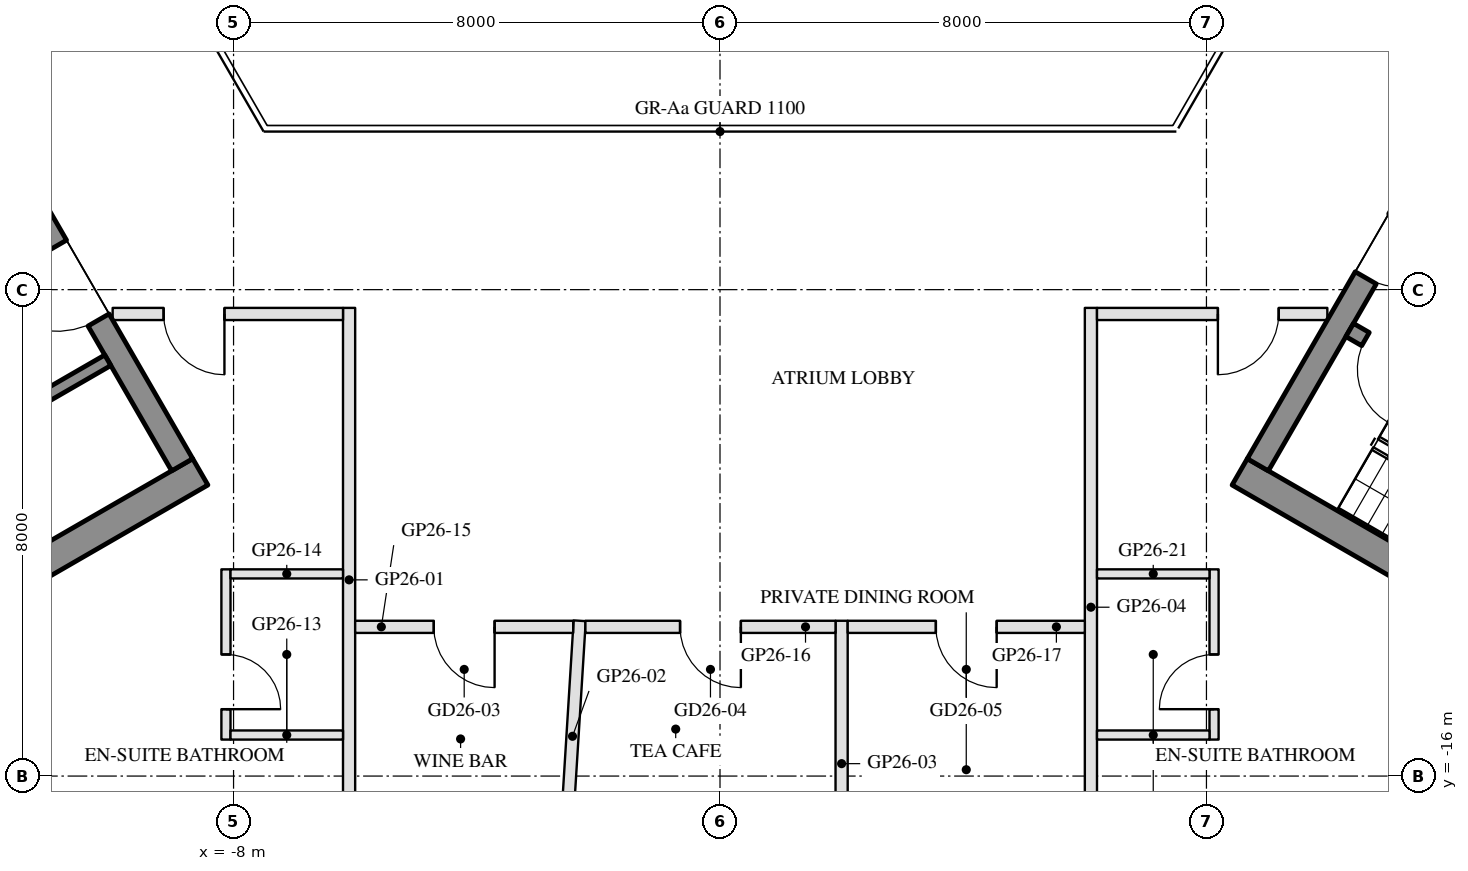
"""IFC4 building model, lengths in metres.
Left out: names, types, materials, properties, quantities, classifications, styles, units other than length and angle.
Written with IfcOpenShell. Run it as: python <this file> out.ifc"""

import sys

from ifc_helpers import new_model, si_unit, direction, frame, frame_2d, origin, place, context, subcontext, project, spatial, rectangle, extrude, element, fill, save


model = new_model("IFC4")
c1 = context("Model", 3, precision=1e-05, world=origin(), true_north=direction((0.0, 1.0)))
c2 = subcontext(c1, "Body", "Model", "MODEL_VIEW")
j1 = project(units=[si_unit("LENGTHUNIT", "METRE"), si_unit("PLANEANGLEUNIT", "RADIAN")], contexts=[c1])
p1 = place(None, origin())
s1 = spatial("IfcSite", under=j1, at=p1, CompositionType="ELEMENT")
p2 = place(p1, origin())
s2 = spatial("IfcBuilding", under=s1, at=p2, CompositionType="ELEMENT")
p3 = place(p2, frame((0.0, 0.0, 272.6)))
s3 = spatial("IfcBuildingStorey", under=s2, at=p3, CompositionType="ELEMENT", Elevation=272.6)
p4 = place(p3, frame((-8.547, -10.997, 0.0), z_axis=(0.0, 0.0, 1.0), x_axis=(-0.866030218785, -0.499991660082, 0.0)))
e1 = element("IfcWall", 1, at=p4, inside=s3, PredefinedType="SHEAR", context=c2, shape_type="SweptSolid", body=[
    extrude(rectangle(XDim=13.031, YDim=0.5, at=frame_2d((6.516, 0.0))), origin(), (0.0, 0.0, 1.0), 3.5),
])
p5 = place(p3, frame((-13.845, -2.22, 0.0), z_axis=(0.0, 0.0, 1.0), x_axis=(0.500004234368, -0.866022959057, 0.0)))
e2 = element("IfcWall", 2, at=p5, inside=s3, PredefinedType="SHEAR", context=c2, shape_type="SweptSolid", body=[
    extrude(rectangle(XDim=10.0, YDim=0.4, at=frame_2d((5.0, 0.0))), origin(), (0.0, 0.0, 1.0), 3.5),
])
p6 = place(p5, frame((3.55, 0.0, 0.0)))
e3 = element("IfcOpeningElement", 3, at=p6, cuts=e2, PredefinedType="OPENING", context=c2, shape_type="SweptSolid", body=[
    extrude(rectangle(XDim=1.1, YDim=2.1, at=frame_2d((0.55, 1.05))), frame((0.0, 0.21, 0.0), z_axis=(0.0, -1.0, 0.0), x_axis=(1.0, 0.0, 0.0)), (0.0, 0.0, 1.0), 0.42),
])
p7 = place(p5, frame((5.85, 0.0, 0.0)))
e4 = element("IfcOpeningElement", 4, at=p7, cuts=e2, PredefinedType="OPENING", context=c2, shape_type="SweptSolid", body=[
    extrude(rectangle(XDim=1.4, YDim=2.1, at=frame_2d((0.7, 1.05))), frame((0.0, 0.21, 0.0), z_axis=(0.0, -1.0, 0.0), x_axis=(1.0, 0.0, 0.0)), (0.0, 0.0, 1.0), 0.42),
])
p8 = place(p3, frame((-10.068, -9.162, 0.0), z_axis=(0.0, 0.0, 1.0), x_axis=(-0.866032725843, -0.499987317609, 0.0)))
e5 = element("IfcWall", 5, at=p8, inside=s3, PredefinedType="SHEAR", context=c2, shape_type="SweptSolid", body=[
    extrude(rectangle(XDim=10.16, YDim=0.2, at=frame_2d((5.08, 0.0))), origin(), (0.0, 0.0, 1.0), 3.5),
])
p9 = place(p8, frame((1.99, 0.0, 0.0)))
e6 = element("IfcOpeningElement", 6, at=p9, cuts=e5, PredefinedType="OPENING", context=c2, shape_type="SweptSolid", body=[
    extrude(rectangle(XDim=0.9, YDim=2.1, at=frame_2d((0.45, 1.05))), frame((0.0, 0.11, 0.0), z_axis=(0.0, -1.0, 0.0), x_axis=(1.0, 0.0, 0.0)), (0.0, 0.0, 1.0), 0.22),
])
p10 = place(p8, frame((7.07, 0.0, 0.0)))
e7 = element("IfcOpeningElement", 7, at=p10, cuts=e5, PredefinedType="OPENING", context=c2, shape_type="SweptSolid", body=[
    extrude(rectangle(XDim=0.9, YDim=2.1, at=frame_2d((0.45, 1.05))), frame((0.0, 0.11, 0.0), z_axis=(0.0, -1.0, 0.0), x_axis=(1.0, 0.0, 0.0)), (0.0, 0.0, 1.0), 0.22),
])
p11 = place(p3, frame((8.547, -10.997, 0.0), z_axis=(0.0, 0.0, 1.0), x_axis=(0.866030218785, -0.499991660082, 0.0)))
e8 = element("IfcWall", 8, at=p11, inside=s3, PredefinedType="SHEAR", context=c2, shape_type="SweptSolid", body=[
    extrude(rectangle(XDim=13.031, YDim=0.5, at=frame_2d((6.516, 0.0))), origin(), (0.0, 0.0, 1.0), 3.5),
])
p12 = place(p3, frame((8.845, -10.88, 0.0), z_axis=(0.0, 0.0, 1.0), x_axis=(0.500004234368, 0.866022959057, 0.0)))
e9 = element("IfcWall", 9, at=p12, inside=s3, PredefinedType="SHEAR", context=c2, shape_type="SweptSolid", body=[
    extrude(rectangle(XDim=10.0, YDim=0.4, at=frame_2d((5.0, 0.0))), origin(), (0.0, 0.0, 1.0), 3.5),
])
p13 = place(p12, frame((3.55, 0.0, 0.0)))
e10 = element("IfcOpeningElement", 10, at=p13, cuts=e9, PredefinedType="OPENING", context=c2, shape_type="SweptSolid", body=[
    extrude(rectangle(XDim=1.1, YDim=2.1, at=frame_2d((0.55, 1.05))), frame((0.0, 0.21, 0.0), z_axis=(0.0, -1.0, 0.0), x_axis=(1.0, 0.0, 0.0)), (0.0, 0.0, 1.0), 0.42),
])
p14 = place(p12, frame((5.85, 0.0, 0.0)))
e11 = element("IfcOpeningElement", 11, at=p14, cuts=e9, PredefinedType="OPENING", context=c2, shape_type="SweptSolid", body=[
    extrude(rectangle(XDim=1.4, YDim=2.1, at=frame_2d((0.7, 1.05))), frame((0.0, 0.21, 0.0), z_axis=(0.0, -1.0, 0.0), x_axis=(1.0, 0.0, 0.0)), (0.0, 0.0, 1.0), 0.42),
])
p15 = place(p3, frame((10.356, -8.664, 0.0), z_axis=(0.0, 0.0, 1.0), x_axis=(0.866028629588, -0.499994412703, 0.0)))
e12 = element("IfcWall", 12, at=p15, inside=s3, PredefinedType="SHEAR", context=c2, shape_type="SweptSolid", body=[
    extrude(rectangle(XDim=6.45, YDim=0.25, at=frame_2d((3.225, 0.0))), origin(), (0.0, 0.0, 1.0), 3.5),
])
p16 = place(p15, frame((0.3, 0.0, 0.0)))
e13 = element("IfcOpeningElement", 13, at=p16, cuts=e12, PredefinedType="OPENING", context=c2, shape_type="SweptSolid", body=[
    extrude(rectangle(XDim=1.0, YDim=2.1, at=frame_2d((0.5, 1.05))), frame((0.0, 0.135, 0.0), z_axis=(0.0, -1.0, 0.0), x_axis=(1.0, 0.0, 0.0)), (0.0, 0.0, 1.0), 0.27),
])
p17 = place(p3, frame((-6.1, -17.246, 0.0), z_axis=(0.0, 0.0, 1.0), x_axis=(0.0, 1.0, 0.0)))
e14 = element("IfcWall", 14, at=p17, inside=s3, PredefinedType="PARTITIONING", context=c2, shape_type="SweptSolid", body=[
    extrude(rectangle(XDim=8.946, YDim=0.2, at=frame_2d((4.473, 0.0))), origin(), (0.0, 0.0, 1.0), 3.1),
])
p18 = place(p3, frame((-2.544, -17.246, 0.0), z_axis=(0.0, 0.0, 1.0), x_axis=(0.062070892854, 0.998071743043, 0.0)))
e15 = element("IfcWall", 15, at=p18, inside=s3, PredefinedType="PARTITIONING", context=c2, shape_type="SweptSolid", body=[
    extrude(rectangle(XDim=3.807, YDim=0.2, at=frame_2d((1.904, 0.0))), origin(), (0.0, 0.0, 1.0), 3.1),
])
p19 = place(p3, frame((2.0, -18.146, 0.0), z_axis=(0.0, 0.0, 1.0), x_axis=(0.0, 1.0, 0.0)))
e16 = element("IfcWall", 16, at=p19, inside=s3, PredefinedType="PARTITIONING", context=c2, shape_type="SweptSolid", body=[
    extrude(rectangle(XDim=4.7, YDim=0.2, at=frame_2d((2.35, 0.0))), origin(), (0.0, 0.0, 1.0), 3.1),
])
p20 = place(p3, frame((6.1, -18.146, 0.0), z_axis=(0.0, 0.0, 1.0), x_axis=(0.0, 1.0, 0.0)))
e17 = element("IfcWall", 17, at=p20, inside=s3, PredefinedType="PARTITIONING", context=c2, shape_type="SweptSolid", body=[
    extrude(rectangle(XDim=9.846, YDim=0.2, at=frame_2d((4.923, 0.0))), origin(), (0.0, 0.0, 1.0), 3.1),
])
p21 = place(p3, frame((-6.2, -8.4, 0.0), z_axis=(0.0, 0.0, 1.0), x_axis=(-1.0, 0.0, 0.0)))
e18 = element("IfcWall", 18, at=p21, inside=s3, PredefinedType="PARTITIONING", context=c2, shape_type="SweptSolid", body=[
    extrude(rectangle(XDim=3.788, YDim=0.2, at=frame_2d((1.894, 0.0))), origin(), (0.0, 0.0, 1.0), 3.0),
])
p22 = place(p21, frame((1.95, 0.0, 0.0)))
e19 = element("IfcOpeningElement", 19, at=p22, cuts=e18, PredefinedType="OPENING", context=c2, shape_type="SweptSolid", body=[
    extrude(rectangle(XDim=1.0, YDim=2.1, at=frame_2d((0.5, 1.05))), frame((0.0, 0.11, 0.0), z_axis=(0.0, -1.0, 0.0), x_axis=(1.0, 0.0, 0.0)), (0.0, 0.0, 1.0), 0.22),
])
p23 = place(p3, frame((-8.125, -12.6, 0.0), z_axis=(0.0, 0.0, 1.0), x_axis=(0.0, -1.0, 0.0)))
e20 = element("IfcWall", 20, at=p23, inside=s3, PredefinedType="PARTITIONING", context=c2, shape_type="SweptSolid", body=[
    extrude(rectangle(XDim=2.8, YDim=0.15, at=frame_2d((1.4, 0.0))), origin(), (0.0, 0.0, 1.0), 3.55),
])
p24 = place(p23, frame((1.4, 0.0, 0.0)))
e21 = element("IfcOpeningElement", 21, at=p24, cuts=e20, PredefinedType="OPENING", context=c2, shape_type="SweptSolid", body=[
    extrude(rectangle(XDim=0.9, YDim=2.1, at=frame_2d((0.45, 1.05))), frame((0.0, 0.085, 0.0), z_axis=(0.0, -1.0, 0.0), x_axis=(1.0, 0.0, 0.0)), (0.0, 0.0, 1.0), 0.17),
])
for number, where, z_axis, x_axis in (
    (22, (-8.05, -15.325, 0.0), (0.0, 0.0, 1.0), (1.0, 0.0, 0.0)),
    (23, (-8.05, -12.675, 0.0), (0.0, 0.0, 1.0), (1.0, 0.0, 0.0)),
):
    element("IfcWall", number, at=place(p3, frame(where, z_axis=z_axis, x_axis=x_axis)), inside=s3, PredefinedType="PARTITIONING", context=c2, shape_type="SweptSolid", body=[
        extrude(rectangle(XDim=1.85, YDim=0.15, at=frame_2d((0.925, 0.0))), origin(), (0.0, 0.0, 1.0), 3.0),
    ])
p25 = place(p3, frame((-2.414, -13.546, 0.0), z_axis=(0.0, 0.0, 1.0), x_axis=(-1.0, 0.0, 0.0)))
e24 = element("IfcWall", 24, at=p25, inside=s3, PredefinedType="PARTITIONING", context=c2, shape_type="SweptSolid", body=[
    extrude(rectangle(XDim=3.586, YDim=0.2, at=frame_2d((1.793, 0.0))), origin(), (0.0, 0.0, 1.0), 3.0),
])
p26 = place(p25, frame((1.293, 0.0, 0.0)))
e25 = element("IfcOpeningElement", 25, at=p26, cuts=e24, PredefinedType="OPENING", context=c2, shape_type="SweptSolid", body=[
    extrude(rectangle(XDim=1.0, YDim=2.1, at=frame_2d((0.5, 1.05))), frame((0.0, 0.11, 0.0), z_axis=(0.0, -1.0, 0.0), x_axis=(1.0, 0.0, 0.0)), (0.0, 0.0, 1.0), 0.22),
])
p27 = place(p3, frame((1.9, -13.546, 0.0), z_axis=(0.0, 0.0, 1.0), x_axis=(-1.0, 0.0, 0.0)))
e26 = element("IfcWall", 26, at=p27, inside=s3, PredefinedType="PARTITIONING", context=c2, shape_type="SweptSolid", body=[
    extrude(rectangle(XDim=4.114, YDim=0.2, at=frame_2d((2.057, 0.0))), origin(), (0.0, 0.0, 1.0), 3.0),
])
p28 = place(p27, frame((1.557, 0.0, 0.0)))
e27 = element("IfcOpeningElement", 27, at=p28, cuts=e26, PredefinedType="OPENING", context=c2, shape_type="SweptSolid", body=[
    extrude(rectangle(XDim=1.0, YDim=2.1, at=frame_2d((0.5, 1.05))), frame((0.0, 0.11, 0.0), z_axis=(0.0, -1.0, 0.0), x_axis=(1.0, 0.0, 0.0)), (0.0, 0.0, 1.0), 0.22),
])
p29 = place(p3, frame((6.0, -13.546, 0.0), z_axis=(0.0, 0.0, 1.0), x_axis=(-1.0, 0.0, 0.0)))
e28 = element("IfcWall", 28, at=p29, inside=s3, PredefinedType="PARTITIONING", context=c2, shape_type="SweptSolid", body=[
    extrude(rectangle(XDim=3.9, YDim=0.2, at=frame_2d((1.95, 0.0))), origin(), (0.0, 0.0, 1.0), 3.0),
])
p30 = place(p29, frame((1.45, 0.0, 0.0)))
e29 = element("IfcOpeningElement", 29, at=p30, cuts=e28, PredefinedType="OPENING", context=c2, shape_type="SweptSolid", body=[
    extrude(rectangle(XDim=1.0, YDim=2.1, at=frame_2d((0.5, 1.05))), frame((0.0, 0.11, 0.0), z_axis=(0.0, -1.0, 0.0), x_axis=(1.0, 0.0, 0.0)), (0.0, 0.0, 1.0), 0.22),
])
p31 = place(p3, frame((9.988, -8.4, 0.0), z_axis=(0.0, 0.0, 1.0), x_axis=(-1.0, 0.0, 0.0)))
e30 = element("IfcWall", 30, at=p31, inside=s3, PredefinedType="PARTITIONING", context=c2, shape_type="SweptSolid", body=[
    extrude(rectangle(XDim=3.788, YDim=0.2, at=frame_2d((1.894, 0.0))), origin(), (0.0, 0.0, 1.0), 3.0),
])
p32 = place(p31, frame((0.8, 0.0, 0.0)))
e31 = element("IfcOpeningElement", 31, at=p32, cuts=e30, PredefinedType="OPENING", context=c2, shape_type="SweptSolid", body=[
    extrude(rectangle(XDim=1.0, YDim=2.1, at=frame_2d((0.5, 1.05))), frame((0.0, 0.11, 0.0), z_axis=(0.0, -1.0, 0.0), x_axis=(1.0, 0.0, 0.0)), (0.0, 0.0, 1.0), 0.22),
])
p33 = place(p3, frame((8.125, -15.4, 0.0), z_axis=(0.0, 0.0, 1.0), x_axis=(0.0, 1.0, 0.0)))
e32 = element("IfcWall", 32, at=p33, inside=s3, PredefinedType="PARTITIONING", context=c2, shape_type="SweptSolid", body=[
    extrude(rectangle(XDim=2.8, YDim=0.15, at=frame_2d((1.4, 0.0))), origin(), (0.0, 0.0, 1.0), 3.55),
])
p34 = place(p33, frame((0.5, 0.0, 0.0)))
e33 = element("IfcOpeningElement", 33, at=p34, cuts=e32, PredefinedType="OPENING", context=c2, shape_type="SweptSolid", body=[
    extrude(rectangle(XDim=0.9, YDim=2.1, at=frame_2d((0.45, 1.05))), frame((0.0, 0.085, 0.0), z_axis=(0.0, -1.0, 0.0), x_axis=(1.0, 0.0, 0.0)), (0.0, 0.0, 1.0), 0.17),
])
for number, where, z_axis, x_axis in (
    (34, (6.2, -15.325, 0.0), (0.0, 0.0, 1.0), (1.0, 0.0, 0.0)),
    (35, (6.2, -12.675, 0.0), (0.0, 0.0, 1.0), (1.0, 0.0, 0.0)),
):
    element("IfcWall", number, at=place(p3, frame(where, z_axis=z_axis, x_axis=x_axis)), inside=s3, PredefinedType="PARTITIONING", context=c2, shape_type="SweptSolid", body=[
        extrude(rectangle(XDim=1.85, YDim=0.15, at=frame_2d((0.925, 0.0))), origin(), (0.0, 0.0, 1.0), 3.0),
    ])
p35 = place(p3, frame((10.075, -0.65, 0.0), z_axis=(0.0, 0.0, 1.0), x_axis=(0.499998569178, -0.866026229868, 0.0)))
e36 = element("IfcWall", 36, at=p35, inside=s3, PredefinedType="PARTITIONING", context=c2, shape_type="SweptSolid", body=[
    extrude(rectangle(XDim=4.388, YDim=0.2, at=frame_2d((2.194, 0.0))), origin(), (0.0, 0.0, 1.0), 3.0),
])
p36 = place(p35, frame((2.55, 0.0, 0.0)))
e37 = element("IfcOpeningElement", 37, at=p36, cuts=e36, PredefinedType="OPENING", context=c2, shape_type="SweptSolid", body=[
    extrude(rectangle(XDim=1.0, YDim=2.1, at=frame_2d((0.5, 1.05))), frame((0.0, 0.11, 0.0), z_axis=(0.0, -1.0, 0.0), x_axis=(1.0, 0.0, 0.0)), (0.0, 0.0, 1.0), 0.22),
])
p37 = place(p3, frame((-12.269, -4.45, 0.0), z_axis=(0.0, 0.0, 1.0), x_axis=(0.500023578739, 0.866011790165, 0.0)))
e38 = element("IfcWall", 38, at=p37, inside=s3, PredefinedType="PARTITIONING", context=c2, shape_type="SweptSolid", body=[
    extrude(rectangle(XDim=5.076, YDim=0.2, at=frame_2d((2.538, 0.0))), origin(), (0.0, 0.0, 1.0), 3.0),
])
p38 = place(p37, frame((2.038, 0.0, 0.0)))
e39 = element("IfcOpeningElement", 39, at=p38, cuts=e38, PredefinedType="OPENING", context=c2, shape_type="SweptSolid", body=[
    extrude(rectangle(XDim=1.0, YDim=2.1, at=frame_2d((0.5, 1.05))), frame((0.0, 0.11, 0.0), z_axis=(0.0, -1.0, 0.0), x_axis=(1.0, 0.0, 0.0)), (0.0, 0.0, 1.0), 0.22),
])
p39 = place(p7, frame((1.4, 0.0, 0.0), z_axis=(0.0, 0.0, 1.0), x_axis=(-1.0, 0.0, 0.0)))
e40 = element("IfcDoor", 40, at=p39, inside=s3, OperationType="DOUBLE_DOOR_SINGLE_SWING", PredefinedType="DOOR", context=c2, shape_type="SweptSolid", body=[
    extrude(rectangle(XDim=1.4, YDim=2.1, at=frame_2d((0.7, 1.05))), frame((0.0, 0.025, 0.0), z_axis=(0.0, -1.0, 0.0), x_axis=(1.0, 0.0, 0.0)), (0.0, 0.0, 1.0), 0.05),
])
fill(e4, e40)
p40 = place(p13, frame((1.1, 0.0, 0.0), z_axis=(0.0, 0.0, 1.0), x_axis=(-1.0, 0.0, 0.0)))
e41 = element("IfcDoor", 41, at=p40, inside=s3, OperationType="SINGLE_SWING_LEFT", PredefinedType="DOOR", context=c2, shape_type="SweptSolid", body=[
    extrude(rectangle(XDim=1.1, YDim=2.1, at=frame_2d((0.55, 1.05))), frame((0.0, 0.025, 0.0), z_axis=(0.0, -1.0, 0.0), x_axis=(1.0, 0.0, 0.0)), (0.0, 0.0, 1.0), 0.05),
])
fill(e10, e41)
p41 = place(p16, frame((1.0, 0.0, 0.0), z_axis=(0.0, 0.0, 1.0), x_axis=(-1.0, 0.0, 0.0)))
e42 = element("IfcDoor", 42, at=p41, inside=s3, OperationType="SINGLE_SWING_LEFT", PredefinedType="DOOR", context=c2, shape_type="SweptSolid", body=[
    extrude(rectangle(XDim=1.0, YDim=2.1, at=frame_2d((0.5, 1.05))), frame((0.0, 0.025, 0.0), z_axis=(0.0, -1.0, 0.0), x_axis=(1.0, 0.0, 0.0)), (0.0, 0.0, 1.0), 0.05),
])
fill(e13, e42)
p42 = place(p24, origin())
e43 = element("IfcDoor", 43, at=p42, inside=s3, OperationType="SINGLE_SWING_RIGHT", PredefinedType="DOOR", context=c2, shape_type="SweptSolid", body=[
    extrude(rectangle(XDim=0.9, YDim=2.1, at=frame_2d((0.45, 1.05))), frame((0.0, 0.025, 0.0), z_axis=(0.0, -1.0, 0.0), x_axis=(1.0, 0.0, 0.0)), (0.0, 0.0, 1.0), 0.05),
])
fill(e21, e43)
p43 = place(p22, origin())
e44 = element("IfcDoor", 44, at=p43, inside=s3, OperationType="SINGLE_SWING_LEFT", PredefinedType="DOOR", context=c2, shape_type="SweptSolid", body=[
    extrude(rectangle(XDim=1.0, YDim=2.1, at=frame_2d((0.5, 1.05))), frame((0.0, 0.025, 0.0), z_axis=(0.0, -1.0, 0.0), x_axis=(1.0, 0.0, 0.0)), (0.0, 0.0, 1.0), 0.05),
])
fill(e19, e44)
p44 = place(p26, origin())
e45 = element("IfcDoor", 45, at=p44, inside=s3, OperationType="SINGLE_SWING_LEFT", PredefinedType="DOOR", context=c2, shape_type="SweptSolid", body=[
    extrude(rectangle(XDim=1.0, YDim=2.1, at=frame_2d((0.5, 1.05))), frame((0.0, 0.025, 0.0), z_axis=(0.0, -1.0, 0.0), x_axis=(1.0, 0.0, 0.0)), (0.0, 0.0, 1.0), 0.05),
])
fill(e25, e45)
p45 = place(p28, origin())
e46 = element("IfcDoor", 46, at=p45, inside=s3, OperationType="SINGLE_SWING_LEFT", PredefinedType="DOOR", context=c2, shape_type="SweptSolid", body=[
    extrude(rectangle(XDim=1.0, YDim=2.1, at=frame_2d((0.5, 1.05))), frame((0.0, 0.025, 0.0), z_axis=(0.0, -1.0, 0.0), x_axis=(1.0, 0.0, 0.0)), (0.0, 0.0, 1.0), 0.05),
])
fill(e27, e46)
p46 = place(p30, origin())
e47 = element("IfcDoor", 47, at=p46, inside=s3, OperationType="SINGLE_SWING_LEFT", PredefinedType="DOOR", context=c2, shape_type="SweptSolid", body=[
    extrude(rectangle(XDim=1.0, YDim=2.1, at=frame_2d((0.5, 1.05))), frame((0.0, 0.025, 0.0), z_axis=(0.0, -1.0, 0.0), x_axis=(1.0, 0.0, 0.0)), (0.0, 0.0, 1.0), 0.05),
])
fill(e29, e47)
p47 = place(p34, origin())
e48 = element("IfcDoor", 48, at=p47, inside=s3, OperationType="SINGLE_SWING_LEFT", PredefinedType="DOOR", context=c2, shape_type="SweptSolid", body=[
    extrude(rectangle(XDim=0.9, YDim=2.1, at=frame_2d((0.45, 1.05))), frame((0.0, 0.025, 0.0), z_axis=(0.0, -1.0, 0.0), x_axis=(1.0, 0.0, 0.0)), (0.0, 0.0, 1.0), 0.05),
])
fill(e33, e48)
p48 = place(p32, origin())
e49 = element("IfcDoor", 49, at=p48, inside=s3, OperationType="SINGLE_SWING_RIGHT", PredefinedType="DOOR", context=c2, shape_type="SweptSolid", body=[
    extrude(rectangle(XDim=1.0, YDim=2.1, at=frame_2d((0.5, 1.05))), frame((0.0, 0.025, 0.0), z_axis=(0.0, -1.0, 0.0), x_axis=(1.0, 0.0, 0.0)), (0.0, 0.0, 1.0), 0.05),
])
fill(e31, e49)
save(model, sys.argv[1])
